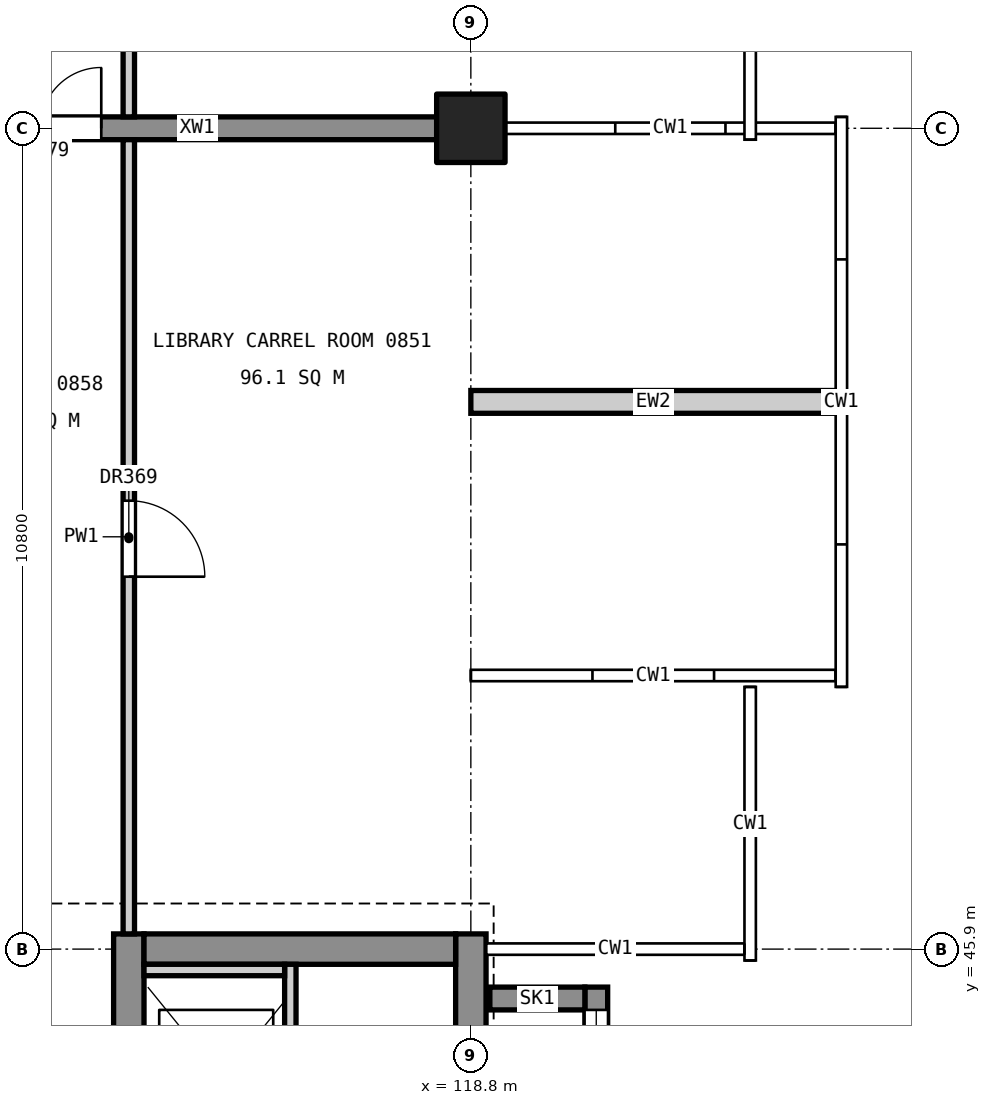
"""IFC4 building model, lengths in metres.
Left out: names, types, materials, properties, quantities, classifications, styles, units other than length and angle.
Written with IfcOpenShell. Run it as: python <this file> out.ifc"""

import sys

from ifc_helpers import new_model, si_unit, direction, frame, frame_2d, origin, origin_2d, place, context, subcontext, project, spatial, rectangle, extrude, element, fill, save


model = new_model("IFC4")
c1 = context("Model", 3, precision=1e-05, world=origin(), true_north=direction((0.0, 1.0)))
c2 = subcontext(c1, "Body", "Model", "MODEL_VIEW")
j1 = project(units=[si_unit("LENGTHUNIT", "METRE"), si_unit("PLANEANGLEUNIT", "RADIAN")], contexts=[c1])
p1 = place(None, origin())
s1 = spatial("IfcSite", under=j1, at=p1, CompositionType="ELEMENT")
p2 = place(p1, origin())
s2 = spatial("IfcBuilding", under=s1, at=p2, CompositionType="ELEMENT")
p3 = place(p2, frame((0.0, 0.0, 41.4)))
s3 = spatial("IfcBuildingStorey", under=s2, at=p3, CompositionType="ELEMENT", Elevation=41.4)
p4 = place(p3, frame((118.8, 56.7, 0.0), z_axis=(0.0, 0.0, 1.0), x_axis=(1.0, 0.0, 0.0)))
e1 = element("IfcColumn", 1, at=p4, inside=s3, PredefinedType="COLUMN", context=c2, shape_type="SweptSolid", body=[
    extrude(rectangle(XDim=0.9, YDim=0.9, at=origin_2d()), origin(), (0.0, 0.0, 1.0), 4.8),
])
p5 = place(p3, frame((118.8, 34.9, 0.0), z_axis=(0.0, 0.0, 1.0), x_axis=(0.0, 1.0, 0.0)))
e2 = element("IfcWall", 2, at=p5, inside=s3, PredefinedType="SHEAR", context=c2, shape_type="SweptSolid", body=[
    extrude(rectangle(XDim=11.2, YDim=0.4, at=frame_2d((5.6, 0.0))), origin(), (0.0, 0.0, 1.0), 4.55),
])
p6 = place(p5, frame((6.11, 0.0, 3.4)))
e3 = element("IfcOpeningElement", 3, at=p6, cuts=e2, PredefinedType="OPENING", context=c2, shape_type="SweptSolid", body=[
    extrude(rectangle(XDim=1.2, YDim=0.9, at=frame_2d((0.6, 0.45))), frame((0.0, 0.21, 0.0), z_axis=(0.0, -1.0, 0.0), x_axis=(1.0, 0.0, 0.0)), (0.0, 0.0, 1.0), 0.42),
])
p7 = place(p3, frame((114.3, 34.9, 0.0), z_axis=(0.0, 0.0, 1.0), x_axis=(0.0, 1.0, 0.0)))
e4 = element("IfcWall", 4, at=p7, inside=s3, PredefinedType="SHEAR", context=c2, shape_type="SweptSolid", body=[
    extrude(rectangle(XDim=11.2, YDim=0.4, at=frame_2d((5.6, 0.0))), origin(), (0.0, 0.0, 1.0), 4.55),
])
p8 = place(p7, frame((0.5, 0.0, 0.0)))
e5 = element("IfcOpeningElement", 5, at=p8, cuts=e4, PredefinedType="OPENING", context=c2, shape_type="SweptSolid", body=[
    extrude(rectangle(XDim=1.4, YDim=2.1, at=frame_2d((0.7, 1.05))), frame((0.0, 0.21, 0.0), z_axis=(0.0, -1.0, 0.0), x_axis=(1.0, 0.0, 0.0)), (0.0, 0.0, 1.0), 0.42),
])
p9 = place(p7, frame((8.75, 0.0, 0.0)))
e6 = element("IfcOpeningElement", 6, at=p9, cuts=e4, PredefinedType="OPENING", context=c2, shape_type="SweptSolid", body=[
    extrude(rectangle(XDim=1.1, YDim=2.1, at=frame_2d((0.55, 1.05))), frame((0.0, 0.21, 0.0), z_axis=(0.0, -1.0, 0.0), x_axis=(1.0, 0.0, 0.0)), (0.0, 0.0, 1.0), 0.42),
])
p10 = place(p3, frame((118.6, 45.9, 0.0), z_axis=(0.0, 0.0, 1.0), x_axis=(-1.0, 0.0, 0.0)))
e7 = element("IfcWall", 7, at=p10, inside=s3, PredefinedType="SHEAR", context=c2, shape_type="SweptSolid", body=[
    extrude(rectangle(XDim=4.1, YDim=0.4, at=frame_2d((2.05, 0.0))), origin(), (0.0, 0.0, 1.0), 4.55),
])
p11 = place(p3, frame((120.45, 43.0, 0.0), z_axis=(0.0, 0.0, 1.0), x_axis=(0.0, 1.0, 0.0)))
e8 = element("IfcWall", 8, at=p11, inside=s3, PredefinedType="SHEAR", context=c2, shape_type="SweptSolid", body=[
    extrude(rectangle(XDim=2.4, YDim=0.3, at=frame_2d((1.2, 0.0))), origin(), (0.0, 0.0, 1.0), 4.8),
])
p12 = place(p11, frame((0.3, 0.0, 3.0)))
e9 = element("IfcOpeningElement", 9, at=p12, cuts=e8, PredefinedType="OPENING", context=c2, shape_type="SweptSolid", body=[
    extrude(rectangle(XDim=1.8, YDim=1.2, at=frame_2d((0.9, 0.6))), frame((0.0, 0.16, 0.0), z_axis=(0.0, -1.0, 0.0), x_axis=(1.0, 0.0, 0.0)), (0.0, 0.0, 1.0), 0.32),
])
p13 = place(p3, frame((119.05, 45.25, 0.0), z_axis=(0.0, 0.0, 1.0), x_axis=(1.0, 0.0, 0.0)))
e10 = element("IfcWall", 10, at=p13, inside=s3, PredefinedType="SHEAR", context=c2, shape_type="SweptSolid", body=[
    extrude(rectangle(XDim=1.25, YDim=0.3, at=frame_2d((0.625, 0.0))), origin(), (0.0, 0.0, 1.0), 4.8),
])
p14 = place(p3, frame((118.35, 56.7, 0.0), z_axis=(0.0, 0.0, 1.0), x_axis=(-1.0, 0.0, 0.0)))
e11 = element("IfcWall", 11, at=p14, inside=s3, PredefinedType="SHEAR", context=c2, shape_type="SweptSolid", body=[
    extrude(rectangle(XDim=6.3, YDim=0.3, at=frame_2d((3.15, 0.0))), origin(), (0.0, 0.0, 1.0), 4.55),
])
p15 = place(p14, frame((4.413, 0.0, 0.0)))
e12 = element("IfcOpeningElement", 12, at=p15, cuts=e11, PredefinedType="OPENING", context=c2, shape_type="SweptSolid", body=[
    extrude(rectangle(XDim=1.6, YDim=2.1, at=frame_2d((0.8, 1.05))), frame((0.0, 0.16, 0.0), z_axis=(0.0, -1.0, 0.0), x_axis=(1.0, 0.0, 0.0)), (0.0, 0.0, 1.0), 0.32),
])
p16 = place(p3, frame((116.425, 43.0, 0.0), z_axis=(0.0, 0.0, 1.0), x_axis=(0.0, 1.0, 0.0)))
e13 = element("IfcWall", 13, at=p16, inside=s3, PredefinedType="SOLIDWALL", context=c2, shape_type="SweptSolid", body=[
    extrude(rectangle(XDim=2.7, YDim=0.15, at=frame_2d((1.35, 0.0))), origin(), (0.0, 0.0, 1.0), 4.55),
])
p17 = place(p3, frame((116.35, 45.625, 0.0), z_axis=(0.0, 0.0, 1.0), x_axis=(-1.0, 0.0, 0.0)))
e14 = element("IfcWall", 14, at=p17, inside=s3, PredefinedType="SOLIDWALL", context=c2, shape_type="SweptSolid", body=[
    extrude(rectangle(XDim=1.85, YDim=0.15, at=frame_2d((0.925, 0.0))), origin(), (0.0, 0.0, 1.0), 4.55),
])
p18 = place(p3, frame((123.6, 53.1, 0.0), z_axis=(0.0, 0.0, 1.0), x_axis=(-1.0, 0.0, 0.0)))
e15 = element("IfcWall", 15, at=p18, inside=s3, PredefinedType="STANDARD", context=c2, shape_type="SweptSolid", body=[
    extrude(rectangle(XDim=4.8, YDim=0.3, at=frame_2d((2.4, 0.0))), origin(), (0.0, 0.0, 1.0), 3.65),
])
p19 = place(p3, frame((114.3, 46.1, 0.0), z_axis=(0.0, 0.0, 1.0), x_axis=(0.0, 1.0, 0.0)))
e16 = element("IfcWall", 16, at=p19, inside=s3, PredefinedType="PARTITIONING", context=c2, shape_type="SweptSolid", body=[
    extrude(rectangle(XDim=10.45, YDim=0.15, at=frame_2d((5.225, 0.0))), origin(), (0.0, 0.0, 1.0), 3.55),
])
p20 = place(p19, frame((4.7, 0.0, 0.0)))
e17 = element("IfcOpeningElement", 17, at=p20, cuts=e16, PredefinedType="OPENING", context=c2, shape_type="SweptSolid", body=[
    extrude(rectangle(XDim=1.0, YDim=2.1, at=frame_2d((0.5, 1.05))), frame((0.0, 0.085, 0.0), z_axis=(0.0, -1.0, 0.0), x_axis=(1.0, 0.0, 0.0)), (0.0, 0.0, 1.0), 0.17),
])
p21 = place(p3, frame((114.3, 56.85, 0.0), z_axis=(0.0, 0.0, 1.0), x_axis=(0.0, 1.0, 0.0)))
e18 = element("IfcWall", 18, at=p21, inside=s3, PredefinedType="PARTITIONING", context=c2, shape_type="SweptSolid", body=[
    extrude(rectangle(XDim=3.25, YDim=0.15, at=frame_2d((1.625, 0.0))), origin(), (0.0, 0.0, 1.0), 3.55),
])
p22 = place(p21, frame((1.15, 0.0, 0.0)))
e19 = element("IfcOpeningElement", 19, at=p22, cuts=e18, PredefinedType="OPENING", context=c2, shape_type="SweptSolid", body=[
    extrude(rectangle(XDim=1.0, YDim=2.1, at=frame_2d((0.5, 1.05))), frame((0.0, 0.085, 0.0), z_axis=(0.0, -1.0, 0.0), x_axis=(1.0, 0.0, 0.0)), (0.0, 0.0, 1.0), 0.17),
])
p23 = place(p12, origin())
e20 = element("IfcWindow", 20, at=p23, inside=s3, PartitioningType="SINGLE_PANEL", PredefinedType="WINDOW", context=c2, shape_type="SweptSolid", body=[
    extrude(rectangle(XDim=1.8, YDim=1.2, at=frame_2d((0.9, 0.6))), frame((0.0, 0.03, 0.0), z_axis=(0.0, -1.0, 0.0), x_axis=(1.0, 0.0, 0.0)), (0.0, 0.0, 1.0), 0.06),
])
fill(e9, e20)
p24 = place(p20, frame((1.0, 0.0, 0.0), z_axis=(0.0, 0.0, 1.0), x_axis=(-1.0, 0.0, 0.0)))
e21 = element("IfcDoor", 21, at=p24, inside=s3, OperationType="SINGLE_SWING_RIGHT", PredefinedType="DOOR", context=c2, shape_type="SweptSolid", body=[
    extrude(rectangle(XDim=1.0, YDim=2.1, at=frame_2d((0.5, 1.05))), frame((0.0, 0.025, 0.0), z_axis=(0.0, -1.0, 0.0), x_axis=(1.0, 0.0, 0.0)), (0.0, 0.0, 1.0), 0.05),
])
fill(e17, e21)
p25 = place(p15, frame((1.6, 0.0, 0.0), z_axis=(0.0, 0.0, 1.0), x_axis=(-1.0, 0.0, 0.0)))
e22 = element("IfcDoor", 22, at=p25, inside=s3, OperationType="DOUBLE_DOOR_SINGLE_SWING", PredefinedType="DOOR", context=c2, shape_type="SweptSolid", body=[
    extrude(rectangle(XDim=1.6, YDim=2.1, at=frame_2d((0.8, 1.05))), frame((0.0, 0.025, 0.0), z_axis=(0.0, -1.0, 0.0), x_axis=(1.0, 0.0, 0.0)), (0.0, 0.0, 1.0), 0.05),
])
fill(e12, e22)
save(model, sys.argv[1])
